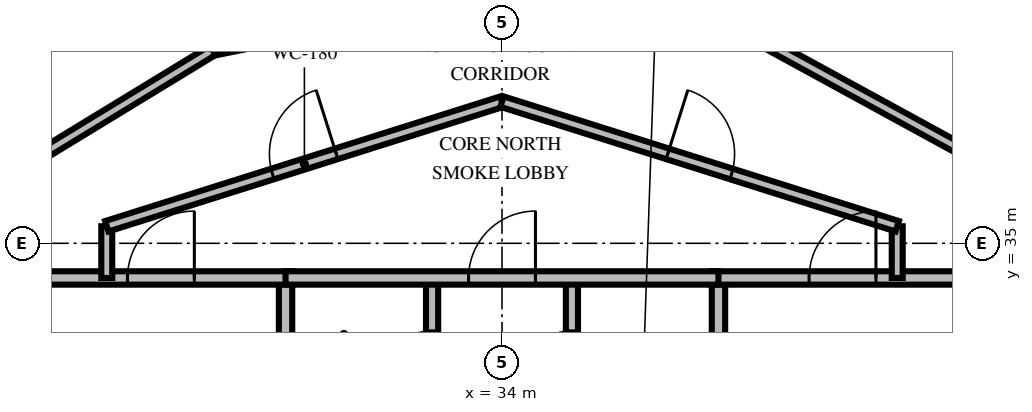
"""IFC4 building model, lengths in metres.
Left out: names, types, materials, properties, quantities, classifications, styles, units other than length and angle.
Written with IfcOpenShell. Run it as: python <this file> out.ifc"""

import sys

from ifc_helpers import new_model, si_unit, direction, frame, frame_2d, origin, place, context, subcontext, project, spatial, rectangle, extrude, element, fill, save


model = new_model("IFC4")
c1 = context("Model", 3, precision=1e-05, world=origin(), true_north=direction((0.0, 1.0)))
c2 = subcontext(c1, "Body", "Model", "MODEL_VIEW")
j1 = project(units=[si_unit("LENGTHUNIT", "METRE"), si_unit("PLANEANGLEUNIT", "RADIAN")], contexts=[c1])
p1 = place(None, origin())
s1 = spatial("IfcSite", under=j1, at=p1, CompositionType="ELEMENT")
p2 = place(p1, origin())
s2 = spatial("IfcBuilding", under=s1, at=p2, CompositionType="ELEMENT")
p3 = place(p2, frame((0.0, 0.0, 166.4)))
s3 = spatial("IfcBuildingStorey", under=s2, at=p3, CompositionType="ELEMENT", Elevation=166.4)
p4 = place(p3, frame((30.44, 30.05, 0.0), z_axis=(0.0, 0.0, 1.0), x_axis=(0.0, 1.0, 0.0)))
e1 = element("IfcWall", 1, at=p4, inside=s3, PredefinedType="SOLIDWALL", context=c2, shape_type="SweptSolid", body=[
    extrude(rectangle(XDim=4.38, YDim=0.22, at=frame_2d((2.19, 0.0))), origin(), (0.0, 0.0, 1.0), 2.46),
])
p5 = place(p4, frame((0.8, 0.0, 0.0)))
e2 = element("IfcOpeningElement", 2, at=p5, cuts=e1, PredefinedType="OPENING", context=c2, shape_type="SweptSolid", body=[
    extrude(rectangle(XDim=1.05, YDim=2.1, at=frame_2d((0.525, 1.05))), frame((0.0, 0.12, 0.0), z_axis=(0.0, -1.0, 0.0), x_axis=(1.0, 0.0, 0.0)), (0.0, 0.0, 1.0), 0.24),
])
p6 = place(p3, frame((26.24, 34.43, 0.0), z_axis=(0.0, 0.0, 1.0), x_axis=(1.0, 0.0, 0.0)))
e3 = element("IfcWall", 3, at=p6, inside=s3, PredefinedType="SOLIDWALL", context=c2, shape_type="SweptSolid", body=[
    extrude(rectangle(XDim=4.31, YDim=0.22, at=frame_2d((2.155, 0.0))), origin(), (0.0, 0.0, 1.0), 2.46),
])
p7 = place(p6, frame((1.6, 0.0, 0.0)))
e4 = element("IfcOpeningElement", 4, at=p7, cuts=e3, PredefinedType="OPENING", context=c2, shape_type="SweptSolid", body=[
    extrude(rectangle(XDim=1.1, YDim=2.15, at=frame_2d((0.55, 1.075))), frame((0.0, 0.12, 0.0), z_axis=(0.0, -1.0, 0.0), x_axis=(1.0, 0.0, 0.0)), (0.0, 0.0, 1.0), 0.24),
])
p8 = place(p3, frame((32.85, 30.05, 0.0), z_axis=(0.0, 0.0, 1.0), x_axis=(0.0, 1.0, 0.0)))
e5 = element("IfcWall", 5, at=p8, inside=s3, PredefinedType="SOLIDWALL", context=c2, shape_type="SweptSolid", body=[
    extrude(rectangle(XDim=4.38, YDim=0.2, at=frame_2d((2.19, 0.0))), origin(), (0.0, 0.0, 1.0), 2.46),
])
p9 = place(p8, frame((2.65, 0.0, 0.0)))
e6 = element("IfcOpeningElement", 6, at=p9, cuts=e5, PredefinedType="OPENING", context=c2, shape_type="SweptSolid", body=[
    extrude(rectangle(XDim=0.86, YDim=2.05, at=frame_2d((0.43, 1.025))), frame((0.0, 0.11, 0.0), z_axis=(0.0, -1.0, 0.0), x_axis=(1.0, 0.0, 0.0)), (0.0, 0.0, 1.0), 0.22),
])
p10 = place(p3, frame((37.56, 30.05, 0.0), z_axis=(0.0, 0.0, 1.0), x_axis=(0.0, 1.0, 0.0)))
e7 = element("IfcWall", 7, at=p10, inside=s3, PredefinedType="SOLIDWALL", context=c2, shape_type="SweptSolid", body=[
    extrude(rectangle(XDim=4.38, YDim=0.22, at=frame_2d((2.19, 0.0))), origin(), (0.0, 0.0, 1.0), 2.46),
])
p11 = place(p10, frame((0.8, 0.0, 0.0)))
e8 = element("IfcOpeningElement", 8, at=p11, cuts=e7, PredefinedType="OPENING", context=c2, shape_type="SweptSolid", body=[
    extrude(rectangle(XDim=1.05, YDim=2.1, at=frame_2d((0.525, 1.05))), frame((0.0, 0.12, 0.0), z_axis=(0.0, -1.0, 0.0), x_axis=(1.0, 0.0, 0.0)), (0.0, 0.0, 1.0), 0.24),
])
p12 = place(p3, frame((37.45, 34.43, 0.0), z_axis=(0.0, 0.0, 1.0), x_axis=(1.0, 0.0, 0.0)))
e9 = element("IfcWall", 9, at=p12, inside=s3, PredefinedType="SOLIDWALL", context=c2, shape_type="SweptSolid", body=[
    extrude(rectangle(XDim=4.31, YDim=0.22, at=frame_2d((2.155, 0.0))), origin(), (0.0, 0.0, 1.0), 2.46),
])
p13 = place(p12, frame((1.6, 0.0, 0.0)))
e10 = element("IfcOpeningElement", 10, at=p13, cuts=e9, PredefinedType="OPENING", context=c2, shape_type="SweptSolid", body=[
    extrude(rectangle(XDim=1.1, YDim=2.15, at=frame_2d((0.55, 1.075))), frame((0.0, 0.12, 0.0), z_axis=(0.0, -1.0, 0.0), x_axis=(1.0, 0.0, 0.0)), (0.0, 0.0, 1.0), 0.24),
])
p14 = place(p3, frame((35.15, 30.05, 0.0), z_axis=(0.0, 0.0, 1.0), x_axis=(0.0, 1.0, 0.0)))
e11 = element("IfcWall", 11, at=p14, inside=s3, PredefinedType="SOLIDWALL", context=c2, shape_type="SweptSolid", body=[
    extrude(rectangle(XDim=4.38, YDim=0.2, at=frame_2d((2.19, 0.0))), origin(), (0.0, 0.0, 1.0), 2.46),
])
p15 = place(p14, frame((2.65, 0.0, 0.0)))
e12 = element("IfcOpeningElement", 12, at=p15, cuts=e11, PredefinedType="OPENING", context=c2, shape_type="SweptSolid", body=[
    extrude(rectangle(XDim=0.86, YDim=2.05, at=frame_2d((0.43, 1.025))), frame((0.0, 0.11, 0.0), z_axis=(0.0, -1.0, 0.0), x_axis=(1.0, 0.0, 0.0)), (0.0, 0.0, 1.0), 0.22),
])
p16 = place(p3, frame((30.44, 34.43, 0.0), z_axis=(0.0, 0.0, 1.0), x_axis=(1.0, 0.0, 0.0)))
e13 = element("IfcWall", 13, at=p16, inside=s3, PredefinedType="SOLIDWALL", context=c2, shape_type="SweptSolid", body=[
    extrude(rectangle(XDim=7.12, YDim=0.22, at=frame_2d((3.56, 0.0))), origin(), (0.0, 0.0, 1.0), 2.46),
])
p17 = place(p16, frame((3.01, 0.0, 0.0)))
e14 = element("IfcOpeningElement", 14, at=p17, cuts=e13, PredefinedType="OPENING", context=c2, shape_type="SweptSolid", body=[
    extrude(rectangle(XDim=1.1, YDim=2.15, at=frame_2d((0.55, 1.075))), frame((0.0, 0.12, 0.0), z_axis=(0.0, -1.0, 0.0), x_axis=(1.0, 0.0, 0.0)), (0.0, 0.0, 1.0), 0.24),
])
for number, where, z_axis, x_axis in (
    (15, (27.5, 34.43, 0.0), (0.0, 0.0, 1.0), (0.0, 1.0, 0.0)),
    (16, (40.5, 35.28, 0.0), (0.0, 0.0, 1.0), (0.0, -1.0, 0.0)),
):
    element("IfcWall", number, at=place(p3, frame(where, z_axis=z_axis, x_axis=x_axis)), inside=s3, PredefinedType="PARTITIONING", context=c2, shape_type="SweptSolid", body=[
        extrude(rectangle(XDim=0.85, YDim=0.18, at=frame_2d((0.425, 0.0))), origin(), (0.0, 0.0, 1.0), 2.46),
    ])
p18 = place(p3, frame((27.5, 35.28, 0.0), z_axis=(0.0, 0.0, 1.0), x_axis=(0.953691418528, 0.300786765376, 0.0)))
e17 = element("IfcWall", 17, at=p18, inside=s3, PredefinedType="PARTITIONING", context=c2, shape_type="SweptSolid", body=[
    extrude(rectangle(XDim=6.816, YDim=0.18, at=frame_2d((3.408, 0.0))), origin(), (0.0, 0.0, 1.0), 2.46),
])
p19 = place(p18, frame((2.858, 0.0, 0.0)))
e18 = element("IfcOpeningElement", 18, at=p19, cuts=e17, PredefinedType="OPENING", context=c2, shape_type="SweptSolid", body=[
    extrude(rectangle(XDim=1.1, YDim=2.15, at=frame_2d((0.55, 1.075))), frame((0.0, 0.1, 0.0), z_axis=(0.0, -1.0, 0.0), x_axis=(1.0, 0.0, 0.0)), (0.0, 0.0, 1.0), 0.2),
])
p20 = place(p3, frame((34.0, 37.33, 0.0), z_axis=(0.0, 0.0, 1.0), x_axis=(0.953691418528, -0.300786765376, 0.0)))
e19 = element("IfcWall", 19, at=p20, inside=s3, PredefinedType="PARTITIONING", context=c2, shape_type="SweptSolid", body=[
    extrude(rectangle(XDim=6.816, YDim=0.18, at=frame_2d((3.408, 0.0))), origin(), (0.0, 0.0, 1.0), 2.46),
])
p21 = place(p20, frame((2.858, 0.0, 0.0)))
e20 = element("IfcOpeningElement", 20, at=p21, cuts=e19, PredefinedType="OPENING", context=c2, shape_type="SweptSolid", body=[
    extrude(rectangle(XDim=1.1, YDim=2.15, at=frame_2d((0.55, 1.075))), frame((0.0, 0.1, 0.0), z_axis=(0.0, -1.0, 0.0), x_axis=(1.0, 0.0, 0.0)), (0.0, 0.0, 1.0), 0.2),
])
p22 = place(p3, frame((42.163, 36.208, 0.0), z_axis=(0.0, 0.0, 1.0), x_axis=(-0.877570600143, 0.479447433787, 0.0)))
e21 = element("IfcWall", 21, at=p22, inside=s3, PredefinedType="PARTITIONING", context=c2, shape_type="SweptSolid", body=[
    extrude(rectangle(XDim=4.539, YDim=0.18, at=frame_2d((2.27, 0.0))), origin(), (0.0, 0.0, 1.0), 2.46),
])
p23 = place(p3, frame((33.692, 39.066, 0.0), z_axis=(0.0, 0.0, 1.0), x_axis=(-0.980443907312, -0.196798741393, 0.0)))
e22 = element("IfcWall", 22, at=p23, inside=s3, PredefinedType="PARTITIONING", context=c2, shape_type="SweptSolid", body=[
    extrude(rectangle(XDim=4.539, YDim=0.18, at=frame_2d((2.27, 0.0))), origin(), (0.0, 0.0, 1.0), 2.46),
])
p24 = place(p3, frame((29.242, 38.173, 0.0), z_axis=(0.0, 0.0, 1.0), x_axis=(-0.854004275156, -0.520265987756, 0.0)))
e23 = element("IfcWall", 23, at=p24, inside=s3, PredefinedType="PARTITIONING", context=c2, shape_type="SweptSolid", body=[
    extrude(rectangle(XDim=4.539, YDim=0.18, at=frame_2d((2.27, 0.0))), origin(), (0.0, 0.0, 1.0), 2.46),
])
p25 = place(p7, origin())
e24 = element("IfcDoor", 24, at=p25, inside=s3, OperationType="SINGLE_SWING_RIGHT", PredefinedType="DOOR", context=c2, shape_type="SweptSolid", body=[
    extrude(rectangle(XDim=1.1, YDim=2.15, at=frame_2d((0.55, 1.075))), frame((0.0, 0.025, 0.0), z_axis=(0.0, -1.0, 0.0), x_axis=(1.0, 0.0, 0.0)), (0.0, 0.0, 1.0), 0.05),
])
fill(e4, e24)
p26 = place(p9, origin())
e25 = element("IfcDoor", 25, at=p26, inside=s3, OperationType="SINGLE_SWING_LEFT", PredefinedType="TRAPDOOR", context=c2, shape_type="SweptSolid", body=[
    extrude(rectangle(XDim=0.86, YDim=2.05, at=frame_2d((0.43, 1.025))), frame((0.0, 0.025, 0.0), z_axis=(0.0, -1.0, 0.0), x_axis=(1.0, 0.0, 0.0)), (0.0, 0.0, 1.0), 0.05),
])
fill(e6, e25)
p27 = place(p13, origin())
e26 = element("IfcDoor", 26, at=p27, inside=s3, OperationType="SINGLE_SWING_RIGHT", PredefinedType="DOOR", context=c2, shape_type="SweptSolid", body=[
    extrude(rectangle(XDim=1.1, YDim=2.15, at=frame_2d((0.55, 1.075))), frame((0.0, 0.025, 0.0), z_axis=(0.0, -1.0, 0.0), x_axis=(1.0, 0.0, 0.0)), (0.0, 0.0, 1.0), 0.05),
])
fill(e10, e26)
p28 = place(p15, origin())
e27 = element("IfcDoor", 27, at=p28, inside=s3, OperationType="SINGLE_SWING_LEFT", PredefinedType="TRAPDOOR", context=c2, shape_type="SweptSolid", body=[
    extrude(rectangle(XDim=0.86, YDim=2.05, at=frame_2d((0.43, 1.025))), frame((0.0, 0.025, 0.0), z_axis=(0.0, -1.0, 0.0), x_axis=(1.0, 0.0, 0.0)), (0.0, 0.0, 1.0), 0.05),
])
fill(e12, e27)
p29 = place(p17, origin())
e28 = element("IfcDoor", 28, at=p29, inside=s3, OperationType="SINGLE_SWING_RIGHT", PredefinedType="DOOR", context=c2, shape_type="SweptSolid", body=[
    extrude(rectangle(XDim=1.1, YDim=2.15, at=frame_2d((0.55, 1.075))), frame((0.0, 0.025, 0.0), z_axis=(0.0, -1.0, 0.0), x_axis=(1.0, 0.0, 0.0)), (0.0, 0.0, 1.0), 0.05),
])
fill(e14, e28)
p30 = place(p19, origin())
e29 = element("IfcDoor", 29, at=p30, inside=s3, OperationType="SINGLE_SWING_RIGHT", PredefinedType="DOOR", context=c2, shape_type="SweptSolid", body=[
    extrude(rectangle(XDim=1.1, YDim=2.15, at=frame_2d((0.55, 1.075))), frame((0.0, 0.025, 0.0), z_axis=(0.0, -1.0, 0.0), x_axis=(1.0, 0.0, 0.0)), (0.0, 0.0, 1.0), 0.05),
])
fill(e18, e29)
p31 = place(p21, origin())
e30 = element("IfcDoor", 30, at=p31, inside=s3, OperationType="SINGLE_SWING_LEFT", PredefinedType="DOOR", context=c2, shape_type="SweptSolid", body=[
    extrude(rectangle(XDim=1.1, YDim=2.15, at=frame_2d((0.55, 1.075))), frame((0.0, 0.025, 0.0), z_axis=(0.0, -1.0, 0.0), x_axis=(1.0, 0.0, 0.0)), (0.0, 0.0, 1.0), 0.05),
])
fill(e20, e30)
save(model, sys.argv[1])
